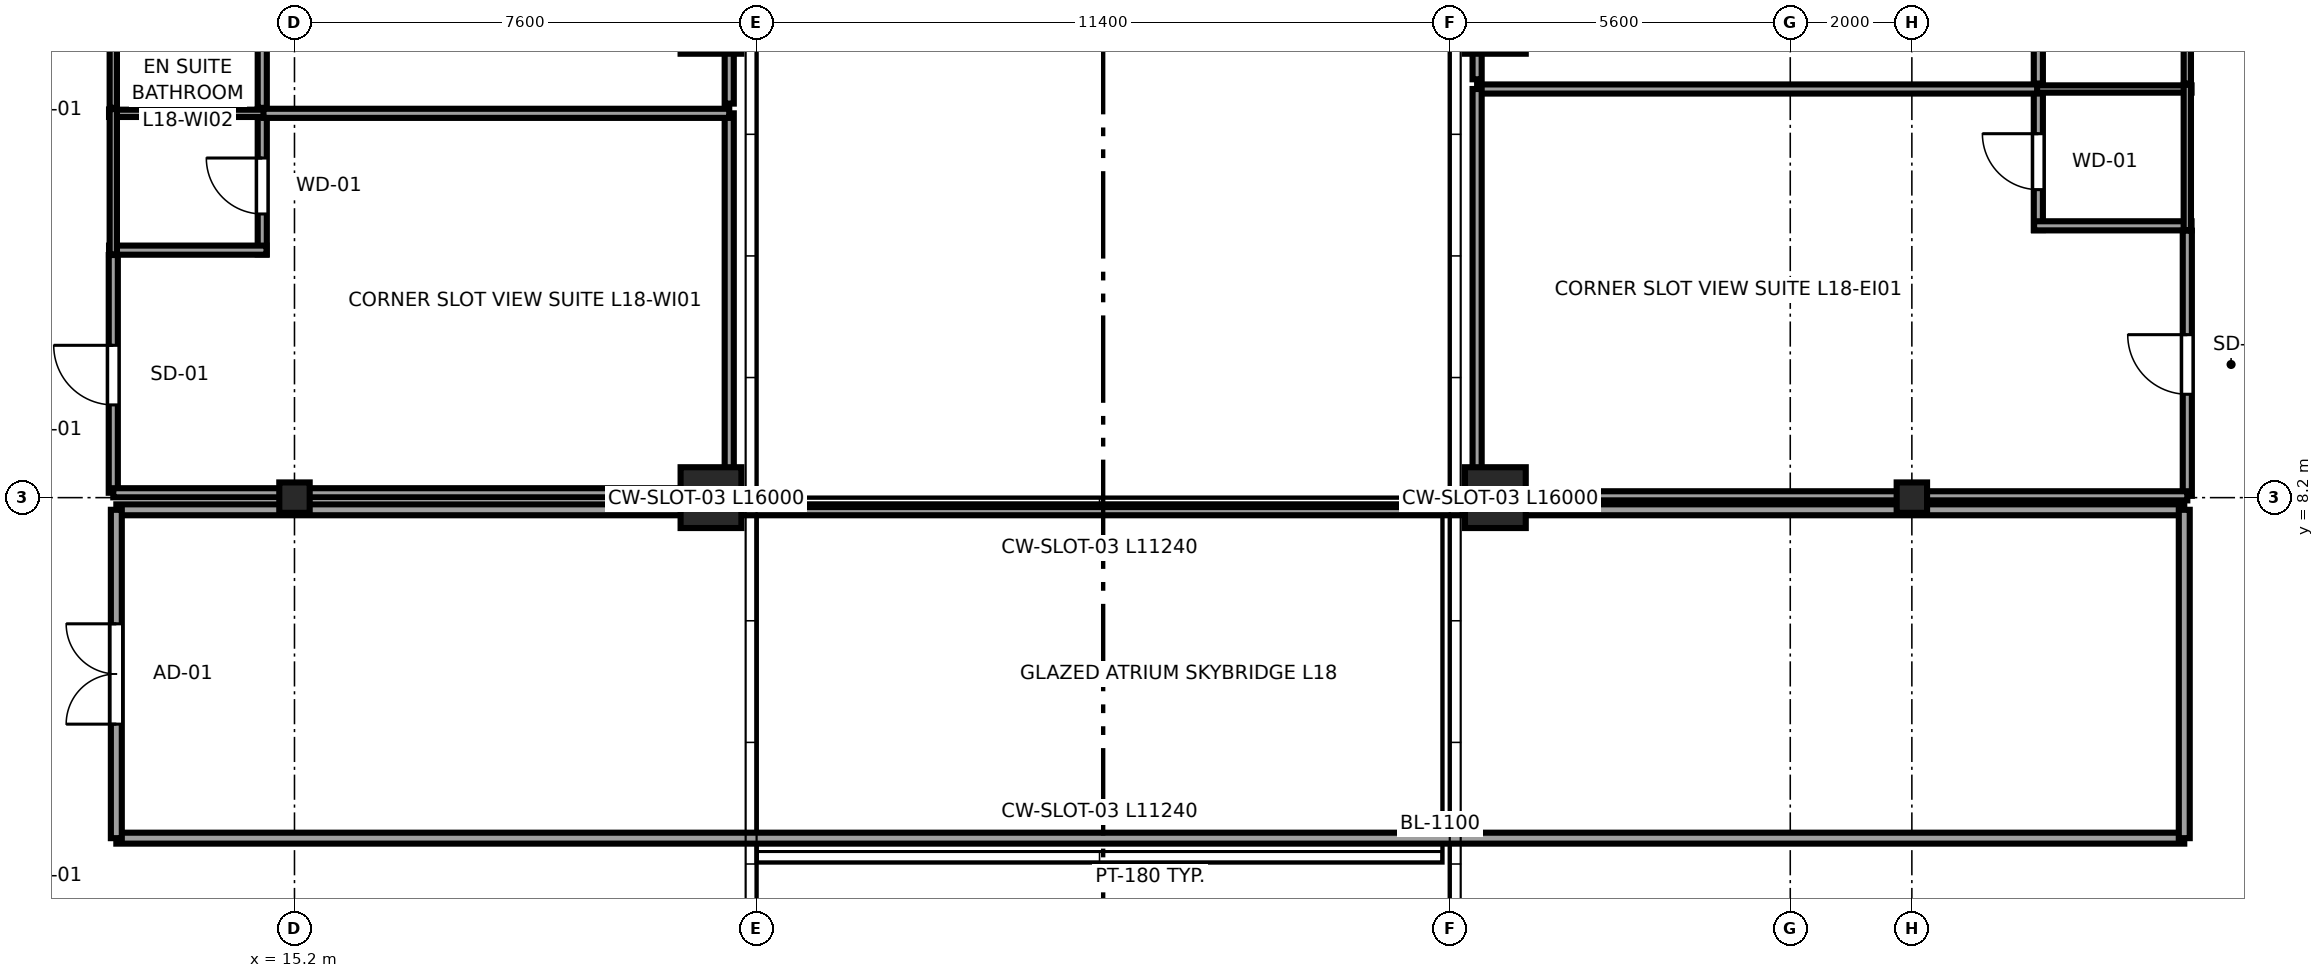
"""IFC4 building model, lengths in metres.
Left out: names, types, materials, properties, quantities, classifications, styles, units other than length and angle.
Written with IfcOpenShell. Run it as: python <this file> out.ifc"""

import sys

from ifc_helpers import new_model, si_unit, direction, frame, frame_2d, origin, origin_2d, place, context, subcontext, project, spatial, rectangle, i_section, extrude, source, transform, mapped, element, fill, save


model = new_model("IFC4")
c1 = context("Model", 3, precision=1e-05, world=origin(), true_north=direction((0.0, 1.0)))
c2 = subcontext(c1, "Body", "Model", "MODEL_VIEW")
j1 = project(units=[si_unit("LENGTHUNIT", "METRE"), si_unit("PLANEANGLEUNIT", "RADIAN")], contexts=[c1])
p1 = place(None, origin())
s1 = spatial("IfcSite", under=j1, at=p1, CompositionType="ELEMENT")
p2 = place(p1, origin())
s2 = spatial("IfcBuilding", under=s1, at=p2, CompositionType="ELEMENT")
p3 = place(p2, frame((0.0, 0.0, 74.6)))
s3 = spatial("IfcBuildingStorey", under=s2, at=p3, CompositionType="ELEMENT", Elevation=74.6)
m1 = source(origin(), c2, "Body", "SweptSolid", [
    extrude(i_section(OverallWidth=0.5, OverallDepth=0.5, WebThickness=0.028, FlangeThickness=0.045, at=origin_2d()), origin(), (0.0, 0.0, 1.0), 3.55),
])
p4 = place(p3, frame((15.2, 8.2, 0.0), z_axis=(0.0, 0.0, 1.0), x_axis=(1.0, 0.0, 0.0)))
e1 = element("IfcColumn", 1, at=p4, inside=s3, PredefinedType="COLUMN", context=c2, shape_type="MappedRepresentation", body=[
    mapped(m1, transform((0.0, 0.0, 0.0), x_axis=(1.0, 0.0, 0.0), y_axis=(0.0, 1.0, 0.0), z_axis=(0.0, 0.0, 1.0), scale=1.0)),
])
m2 = source(origin(), c2, "Body", "SweptSolid", [
    extrude(rectangle(XDim=1.0, YDim=1.0, at=origin_2d()), origin(), (0.0, 0.0, 1.0), 3.55),
])
for number, where, z_axis, x_axis in (
    (2, (22.05, 8.2, 0.0), (0.0, 0.0, 1.0), (1.0, 0.0, 0.0)),
    (3, (22.05, 16.0, 0.0), (0.0, 0.0, 1.0), (1.0, 0.0, 0.0)),
    (4, (34.95, 8.2, 0.0), (0.0, 0.0, 1.0), (1.0, 0.0, 0.0)),
    (5, (34.95, 16.0, 0.0), (0.0, 0.0, 1.0), (1.0, 0.0, 0.0)),
):
    element("IfcColumn", number, at=place(p3, frame(where, z_axis=z_axis, x_axis=x_axis)), inside=s3, PredefinedType="COLUMN", context=c2, shape_type="MappedRepresentation", body=[
        mapped(m2, transform((0.0, 0.0, 0.0), x_axis=(1.0, 0.0, 0.0), y_axis=(0.0, 1.0, 0.0), z_axis=(0.0, 0.0, 1.0), scale=1.0)),
    ])
p5 = place(p3, frame((41.8, 8.2, 0.0), z_axis=(0.0, 0.0, 1.0), x_axis=(1.0, 0.0, 0.0)))
e6 = element("IfcColumn", 6, at=p5, inside=s3, PredefinedType="COLUMN", context=c2, shape_type="MappedRepresentation", body=[
    mapped(m1, transform((0.0, 0.0, 0.0), x_axis=(1.0, 0.0, 0.0), y_axis=(0.0, 1.0, 0.0), z_axis=(0.0, 0.0, 1.0), scale=1.0)),
])
p6 = place(p3, frame((14.67, 12.2, 0.0), z_axis=(0.0, 0.0, 1.0), x_axis=(0.0, 1.0, 0.0)))
e7 = element("IfcWall", 7, at=p6, inside=s3, PredefinedType="PARTITIONING", context=c2, shape_type="SweptSolid", body=[
    extrude(rectangle(XDim=2.39, YDim=0.15, at=frame_2d((1.195, 0.0))), origin(), (0.0, 0.0, 1.0), 3.37),
])
p7 = place(p6, frame((0.665, 0.0, 0.0)))
e8 = element("IfcOpeningElement", 8, at=p7, cuts=e7, PredefinedType="OPENING", context=c2, shape_type="SweptSolid", body=[
    extrude(rectangle(XDim=0.92, YDim=2.01, at=frame_2d((0.46, 1.005))), frame((0.0, 0.085, 0.0), z_axis=(0.0, -1.0, 0.0), x_axis=(1.0, 0.0, 0.0)), (0.0, 0.0, 1.0), 0.17),
])
p8 = place(p3, frame((12.15, 12.27, 0.0), z_axis=(0.0, 0.0, 1.0), x_axis=(1.0, 0.0, 0.0)))
e9 = element("IfcWall", 9, at=p8, inside=s3, PredefinedType="PARTITIONING", context=c2, shape_type="SweptSolid", body=[
    extrude(rectangle(XDim=2.59, YDim=0.15, at=frame_2d((1.295, 0.0))), origin(), (0.0, 0.0, 1.0), 3.37),
])
p9 = place(p3, frame((12.15, 14.52, 0.0), z_axis=(0.0, 0.0, 1.0), x_axis=(1.0, 0.0, 0.0)))
e10 = element("IfcWall", 10, at=p9, inside=s3, PredefinedType="PLUMBINGWALL", context=c2, shape_type="SweptSolid", body=[
    extrude(rectangle(XDim=2.59, YDim=0.12, at=frame_2d((1.295, 0.0))), origin(), (0.0, 0.0, 1.0), 3.37),
])
p10 = place(p3, frame((12.22, 12.2, 0.0), z_axis=(0.0, 0.0, 1.0), x_axis=(0.0, 1.0, 0.0)))
e11 = element("IfcWall", 11, at=p10, inside=s3, PredefinedType="PLUMBINGWALL", context=c2, shape_type="SweptSolid", body=[
    extrude(rectangle(XDim=2.39, YDim=0.12, at=frame_2d((1.195, 0.0))), origin(), (0.0, 0.0, 1.0), 3.37),
])
p11 = place(p3, frame((14.67, 14.61, 0.0), z_axis=(0.0, 0.0, 1.0), x_axis=(0.0, 1.0, 0.0)))
e12 = element("IfcWall", 12, at=p11, inside=s3, PredefinedType="PARTITIONING", context=c2, shape_type="SweptSolid", body=[
    extrude(rectangle(XDim=2.39, YDim=0.15, at=frame_2d((1.195, 0.0))), origin(), (0.0, 0.0, 1.0), 3.37),
])
p12 = place(p3, frame((12.22, 14.61, 0.0), z_axis=(0.0, 0.0, 1.0), x_axis=(0.0, 1.0, 0.0)))
e13 = element("IfcWall", 13, at=p12, inside=s3, PredefinedType="PLUMBINGWALL", context=c2, shape_type="SweptSolid", body=[
    extrude(rectangle(XDim=2.39, YDim=0.12, at=frame_2d((1.195, 0.0))), origin(), (0.0, 0.0, 1.0), 3.37),
])
p13 = place(p3, frame((43.88, 12.6, 0.0), z_axis=(0.0, 0.0, 1.0), x_axis=(0.0, 1.0, 0.0)))
e14 = element("IfcWall", 14, at=p13, inside=s3, PredefinedType="PARTITIONING", context=c2, shape_type="SweptSolid", body=[
    extrude(rectangle(XDim=2.39, YDim=0.15, at=frame_2d((1.195, 0.0))), origin(), (0.0, 0.0, 1.0), 3.37),
])
p14 = place(p13, frame((0.665, 0.0, 0.0)))
e15 = element("IfcOpeningElement", 15, at=p14, cuts=e14, PredefinedType="OPENING", context=c2, shape_type="SweptSolid", body=[
    extrude(rectangle(XDim=0.92, YDim=2.01, at=frame_2d((0.46, 1.005))), frame((0.0, 0.085, 0.0), z_axis=(0.0, -1.0, 0.0), x_axis=(1.0, 0.0, 0.0)), (0.0, 0.0, 1.0), 0.17),
])
p15 = place(p3, frame((43.81, 12.67, 0.0), z_axis=(0.0, 0.0, 1.0), x_axis=(1.0, 0.0, 0.0)))
e16 = element("IfcWall", 16, at=p15, inside=s3, PredefinedType="PARTITIONING", context=c2, shape_type="SweptSolid", body=[
    extrude(rectangle(XDim=2.59, YDim=0.15, at=frame_2d((1.295, 0.0))), origin(), (0.0, 0.0, 1.0), 3.37),
])
p16 = place(p3, frame((43.81, 14.92, 0.0), z_axis=(0.0, 0.0, 1.0), x_axis=(1.0, 0.0, 0.0)))
e17 = element("IfcWall", 17, at=p16, inside=s3, PredefinedType="PLUMBINGWALL", context=c2, shape_type="SweptSolid", body=[
    extrude(rectangle(XDim=2.59, YDim=0.12, at=frame_2d((1.295, 0.0))), origin(), (0.0, 0.0, 1.0), 3.37),
])
p17 = place(p3, frame((46.33, 12.6, 0.0), z_axis=(0.0, 0.0, 1.0), x_axis=(0.0, 1.0, 0.0)))
e18 = element("IfcWall", 18, at=p17, inside=s3, PredefinedType="PLUMBINGWALL", context=c2, shape_type="SweptSolid", body=[
    extrude(rectangle(XDim=2.39, YDim=0.12, at=frame_2d((1.195, 0.0))), origin(), (0.0, 0.0, 1.0), 3.37),
])
p18 = place(p3, frame((43.88, 15.01, 0.0), z_axis=(0.0, 0.0, 1.0), x_axis=(0.0, 1.0, 0.0)))
e19 = element("IfcWall", 19, at=p18, inside=s3, PredefinedType="PARTITIONING", context=c2, shape_type="SweptSolid", body=[
    extrude(rectangle(XDim=2.39, YDim=0.15, at=frame_2d((1.195, 0.0))), origin(), (0.0, 0.0, 1.0), 3.37),
])
p19 = place(p18, frame((0.665, 0.0, 0.0)))
e20 = element("IfcOpeningElement", 20, at=p19, cuts=e19, PredefinedType="OPENING", context=c2, shape_type="SweptSolid", body=[
    extrude(rectangle(XDim=0.92, YDim=2.01, at=frame_2d((0.46, 1.005))), frame((0.0, 0.085, 0.0), z_axis=(0.0, -1.0, 0.0), x_axis=(1.0, 0.0, 0.0)), (0.0, 0.0, 1.0), 0.17),
])
p20 = place(p3, frame((46.33, 15.01, 0.0), z_axis=(0.0, 0.0, 1.0), x_axis=(0.0, 1.0, 0.0)))
e21 = element("IfcWall", 21, at=p20, inside=s3, PredefinedType="PLUMBINGWALL", context=c2, shape_type="SweptSolid", body=[
    extrude(rectangle(XDim=2.39, YDim=0.12, at=frame_2d((1.195, 0.0))), origin(), (0.0, 0.0, 1.0), 3.37),
])
p21 = place(p3, frame((12.22, 8.28, 0.0), z_axis=(0.0, 0.0, 1.0), x_axis=(0.0, 1.0, 0.0)))
e22 = element("IfcWall", 22, at=p21, inside=s3, PredefinedType="PARTITIONING", context=c2, shape_type="SweptSolid", body=[
    extrude(rectangle(XDim=3.91, YDim=0.15, at=frame_2d((1.955, 0.0))), origin(), (0.0, 0.0, 1.0), 3.37),
])
p22 = place(p21, frame((1.445, 0.0, 0.0)))
e23 = element("IfcOpeningElement", 23, at=p22, cuts=e22, PredefinedType="OPENING", context=c2, shape_type="SweptSolid", body=[
    extrude(rectangle(XDim=0.98, YDim=2.12, at=frame_2d((0.49, 1.06))), frame((0.0, 0.085, 0.0), z_axis=(0.0, -1.0, 0.0), x_axis=(1.0, 0.0, 0.0)), (0.0, 0.0, 1.0), 0.17),
])
p23 = place(p3, frame((12.22, 8.28, 0.0), z_axis=(0.0, 0.0, 1.0), x_axis=(1.0, 0.0, 0.0)))
e24 = element("IfcWall", 24, at=p23, inside=s3, PredefinedType="PARTITIONING", context=c2, shape_type="SweptSolid", body=[
    extrude(rectangle(XDim=10.13, YDim=0.15, at=frame_2d((5.065, 0.0))), origin(), (0.0, 0.0, 1.0), 2.748),
])
p24 = place(p3, frame((22.35, 8.28, 0.0), z_axis=(0.0, 0.0, 1.0), x_axis=(0.0, 1.0, 0.0)))
e25 = element("IfcWall", 25, at=p24, inside=s3, PredefinedType="PARTITIONING", context=c2, shape_type="SweptSolid", body=[
    extrude(rectangle(XDim=6.24, YDim=0.15, at=frame_2d((3.12, 0.0))), origin(), (0.0, 0.0, 1.0), 3.37),
])
p25 = place(p3, frame((14.69, 14.52, 0.0), z_axis=(0.0, 0.0, 1.0), x_axis=(1.0, 0.0, 0.0)))
e26 = element("IfcWall", 26, at=p25, inside=s3, PredefinedType="PARTITIONING", context=c2, shape_type="SweptSolid", body=[
    extrude(rectangle(XDim=7.66, YDim=0.15, at=frame_2d((3.83, 0.0))), origin(), (0.0, 0.0, 1.0), 3.37),
])
p26 = place(p3, frame((22.35, 14.68, 0.0), z_axis=(0.0, 0.0, 1.0), x_axis=(0.0, 1.0, 0.0)))
e27 = element("IfcWall", 27, at=p26, inside=s3, PredefinedType="PARTITIONING", context=c2, shape_type="SweptSolid", body=[
    extrude(rectangle(XDim=6.34, YDim=0.15, at=frame_2d((3.17, 0.0))), origin(), (0.0, 0.0, 1.0), 3.37),
])
p27 = place(p3, frame((46.33, 8.23, 0.0), z_axis=(0.0, 0.0, 1.0), x_axis=(0.0, 1.0, 0.0)))
e28 = element("IfcWall", 28, at=p27, inside=s3, PredefinedType="PARTITIONING", context=c2, shape_type="SweptSolid", body=[
    extrude(rectangle(XDim=4.36, YDim=0.15, at=frame_2d((2.18, 0.0))), origin(), (0.0, 0.0, 1.0), 3.37),
])
p28 = place(p27, frame((1.67, 0.0, 0.0)))
e29 = element("IfcOpeningElement", 29, at=p28, cuts=e28, PredefinedType="OPENING", context=c2, shape_type="SweptSolid", body=[
    extrude(rectangle(XDim=0.98, YDim=2.12, at=frame_2d((0.49, 1.06))), frame((0.0, 0.085, 0.0), z_axis=(0.0, -1.0, 0.0), x_axis=(1.0, 0.0, 0.0)), (0.0, 0.0, 1.0), 0.17),
])
p29 = place(p3, frame((34.65, 8.23, 0.0), z_axis=(0.0, 0.0, 1.0), x_axis=(1.0, 0.0, 0.0)))
e30 = element("IfcWall", 30, at=p29, inside=s3, PredefinedType="PARTITIONING", context=c2, shape_type="SweptSolid", body=[
    extrude(rectangle(XDim=11.68, YDim=0.15, at=frame_2d((5.84, 0.0))), origin(), (0.0, 0.0, 1.0), 2.748),
])
p30 = place(p3, frame((34.65, 14.92, 0.0), z_axis=(0.0, 0.0, 1.0), x_axis=(1.0, 0.0, 0.0)))
e31 = element("IfcWall", 31, at=p30, inside=s3, PredefinedType="PARTITIONING", context=c2, shape_type="SweptSolid", body=[
    extrude(rectangle(XDim=9.21, YDim=0.15, at=frame_2d((4.605, 0.0))), origin(), (0.0, 0.0, 1.0), 3.37),
])
p31 = place(p3, frame((34.65, 8.23, 0.0), z_axis=(0.0, 0.0, 1.0), x_axis=(0.0, 1.0, 0.0)))
e32 = element("IfcWall", 32, at=p31, inside=s3, PredefinedType="PARTITIONING", context=c2, shape_type="SweptSolid", body=[
    extrude(rectangle(XDim=6.69, YDim=0.15, at=frame_2d((3.345, 0.0))), origin(), (0.0, 0.0, 1.0), 3.37),
])
p32 = place(p3, frame((34.65, 15.08, 0.0), z_axis=(0.0, 0.0, 1.0), x_axis=(0.0, 1.0, 0.0)))
e33 = element("IfcWall", 33, at=p32, inside=s3, PredefinedType="PARTITIONING", context=c2, shape_type="SweptSolid", body=[
    extrude(rectangle(XDim=5.94, YDim=0.15, at=frame_2d((2.97, 0.0))), origin(), (0.0, 0.0, 1.0), 3.37),
])
for number, where, z_axis, x_axis in (
    (34, (12.27, 2.6, 0.0), (0.0, 0.0, 1.0), (1.0, 0.0, 0.0)),
    (35, (12.27, 8.0, 0.0), (0.0, 0.0, 1.0), (1.0, 0.0, 0.0)),
):
    element("IfcWall", number, at=place(p3, frame(where, z_axis=z_axis, x_axis=x_axis)), inside=s3, PredefinedType="PARTITIONING", context=c2, shape_type="SweptSolid", body=[
        extrude(rectangle(XDim=34.01, YDim=0.18, at=frame_2d((17.005, 0.0))), origin(), (0.0, 0.0, 1.0), 3.37),
    ])
p33 = place(p3, frame((12.27, 2.6, 0.0), z_axis=(0.0, 0.0, 1.0), x_axis=(0.0, 1.0, 0.0)))
e36 = element("IfcWall", 36, at=p33, inside=s3, PredefinedType="PARTITIONING", context=c2, shape_type="SweptSolid", body=[
    extrude(rectangle(XDim=5.4, YDim=0.18, at=frame_2d((2.7, 0.0))), origin(), (0.0, 0.0, 1.0), 3.37),
])
p34 = place(p33, frame((1.875, 0.0, 0.0)))
e37 = element("IfcOpeningElement", 37, at=p34, cuts=e36, PredefinedType="OPENING", context=c2, shape_type="SweptSolid", body=[
    extrude(rectangle(XDim=1.65, YDim=2.15, at=frame_2d((0.825, 1.075))), frame((0.0, 0.1, 0.0), z_axis=(0.0, -1.0, 0.0), x_axis=(1.0, 0.0, 0.0)), (0.0, 0.0, 1.0), 0.2),
])
p35 = place(p3, frame((46.28, 2.6, 0.0), z_axis=(0.0, 0.0, 1.0), x_axis=(0.0, 1.0, 0.0)))
e38 = element("IfcWall", 38, at=p35, inside=s3, PredefinedType="PARTITIONING", context=c2, shape_type="SweptSolid", body=[
    extrude(rectangle(XDim=5.4, YDim=0.18, at=frame_2d((2.7, 0.0))), origin(), (0.0, 0.0, 1.0), 3.37),
])
m3 = source(origin(), c2, "Body", "SweptSolid", [
    extrude(rectangle(XDim=0.92, YDim=2.01, at=frame_2d((0.46, 1.005))), frame((0.0, 0.025, 0.0), z_axis=(0.0, -1.0, 0.0), x_axis=(1.0, 0.0, 0.0)), (0.0, 0.0, 1.0), 0.05),
])
p36 = place(p7, origin())
e39 = element("IfcDoor", 39, at=p36, inside=s3, OperationType="SINGLE_SWING_RIGHT", PredefinedType="DOOR", context=c2, shape_type="MappedRepresentation", body=[
    mapped(m3, transform((0.0, 0.0, 0.0), x_axis=(1.0, 0.0, 0.0), y_axis=(0.0, 1.0, 0.0), z_axis=(0.0, 0.0, 1.0), scale=1.0)),
])
fill(e8, e39)
p37 = place(p14, origin())
e40 = element("IfcDoor", 40, at=p37, inside=s3, OperationType="SINGLE_SWING_RIGHT", PredefinedType="DOOR", context=c2, shape_type="MappedRepresentation", body=[
    mapped(m3, transform((0.0, 0.0, 0.0), x_axis=(1.0, 0.0, 0.0), y_axis=(0.0, 1.0, 0.0), z_axis=(0.0, 0.0, 1.0), scale=1.0)),
])
fill(e15, e40)
m4 = source(origin(), c2, "Body", "SweptSolid", [
    extrude(rectangle(XDim=0.98, YDim=2.12, at=frame_2d((0.49, 1.06))), frame((0.0, 0.025, 0.0), z_axis=(0.0, -1.0, 0.0), x_axis=(1.0, 0.0, 0.0)), (0.0, 0.0, 1.0), 0.05),
])
p38 = place(p22, origin())
e41 = element("IfcDoor", 41, at=p38, inside=s3, OperationType="SINGLE_SWING_RIGHT", PredefinedType="DOOR", context=c2, shape_type="MappedRepresentation", body=[
    mapped(m4, transform((0.0, 0.0, 0.0), x_axis=(1.0, 0.0, 0.0), y_axis=(0.0, 1.0, 0.0), z_axis=(0.0, 0.0, 1.0), scale=1.0)),
])
fill(e23, e41)
p39 = place(p28, origin())
e42 = element("IfcDoor", 42, at=p39, inside=s3, OperationType="SINGLE_SWING_RIGHT", PredefinedType="DOOR", context=c2, shape_type="MappedRepresentation", body=[
    mapped(m4, transform((0.0, 0.0, 0.0), x_axis=(1.0, 0.0, 0.0), y_axis=(0.0, 1.0, 0.0), z_axis=(0.0, 0.0, 1.0), scale=1.0)),
])
fill(e29, e42)
m5 = source(origin(), c2, "Body", "SweptSolid", [
    extrude(rectangle(XDim=1.65, YDim=2.15, at=frame_2d((0.825, 1.075))), frame((0.0, 0.025, 0.0), z_axis=(0.0, -1.0, 0.0), x_axis=(1.0, 0.0, 0.0)), (0.0, 0.0, 1.0), 0.05),
])
p40 = place(p34, origin())
e43 = element("IfcDoor", 43, at=p40, inside=s3, OperationType="DOUBLE_DOOR_SINGLE_SWING", PredefinedType="DOOR", context=c2, shape_type="MappedRepresentation", body=[
    mapped(m5, transform((0.0, 0.0, 0.0), x_axis=(1.0, 0.0, 0.0), y_axis=(0.0, 1.0, 0.0), z_axis=(0.0, 0.0, 1.0), scale=1.0)),
])
fill(e37, e43)
save(model, sys.argv[1])
